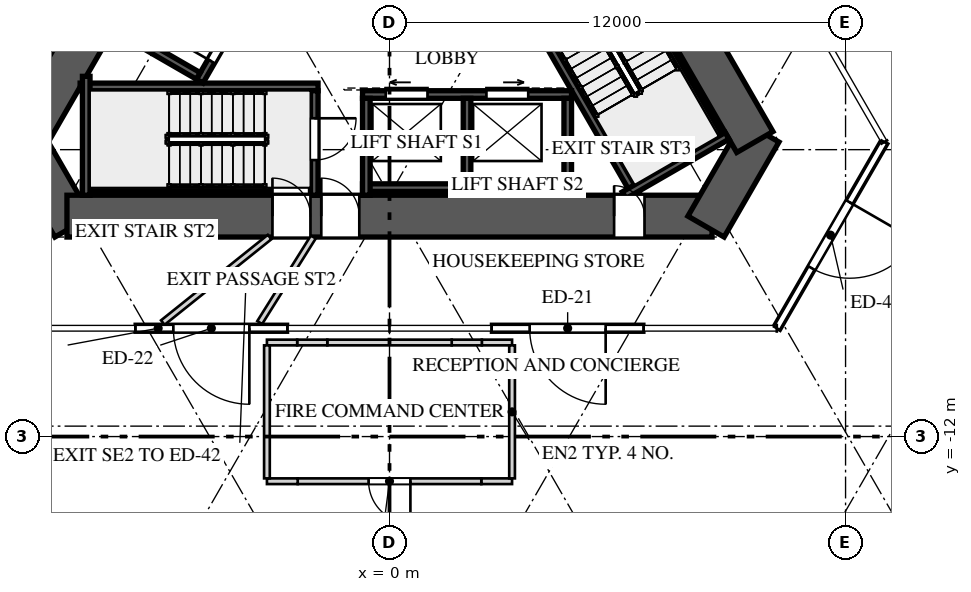
"""IFC4 building model, lengths in metres.
Left out: names, types, materials, properties, quantities, classifications, styles, units other than length and angle.
Written with IfcOpenShell. Run it as: python <this file> out.ifc"""

import sys

from ifc_helpers import new_model, si_unit, direction, frame, frame_2d, origin, place, context, subcontext, project, spatial, rectangle, extrude, element, fill, save


model = new_model("IFC4")
c1 = context("Model", 3, precision=1e-05, world=origin(), true_north=direction((0.0, 1.0)))
c2 = subcontext(c1, "Body", "Model", "MODEL_VIEW")
j1 = project(units=[si_unit("LENGTHUNIT", "METRE"), si_unit("PLANEANGLEUNIT", "RADIAN")], contexts=[c1])
p1 = place(None, origin())
s1 = spatial("IfcSite", under=j1, at=p1, CompositionType="ELEMENT")
p2 = place(p1, origin())
s2 = spatial("IfcBuilding", under=s1, at=p2, CompositionType="ELEMENT")
p3 = place(p2, origin())
s3 = spatial("IfcBuildingStorey", under=s2, at=p3, CompositionType="ELEMENT", Elevation=0.0)
p4 = place(p3, frame((-1.126, 10.45, 0.0), z_axis=(0.0, 0.0, 1.0), x_axis=(-0.500001757713, -0.866024388966, 0.0)))
e1 = element("IfcWall", 1, at=p4, inside=s3, PredefinedType="SHEAR", context=c2, shape_type="SweptSolid", body=[
    extrude(rectangle(XDim=16.974, YDim=1.1, at=frame_2d((8.487, 0.0))), origin(), (0.0, 0.0, 1.0), 10.0),
])
p5 = place(p4, frame((5.407, 0.0, 0.0)))
e2 = element("IfcOpeningElement", 2, at=p5, cuts=e1, PredefinedType="OPENING", context=c2, shape_type="SweptSolid", body=[
    extrude(rectangle(XDim=1.0, YDim=2.4, at=frame_2d((0.5, 1.2))), frame((0.0, 0.56, 0.0), z_axis=(0.0, -1.0, 0.0), x_axis=(1.0, 0.0, 0.0)), (0.0, 0.0, 1.0), 1.12),
])
p6 = place(p4, frame((6.692, 0.0, 0.0)))
e3 = element("IfcOpeningElement", 3, at=p6, cuts=e1, PredefinedType="OPENING", context=c2, shape_type="SweptSolid", body=[
    extrude(rectangle(XDim=1.0, YDim=2.4, at=frame_2d((0.5, 1.2))), frame((0.0, 0.56, 0.0), z_axis=(0.0, -1.0, 0.0), x_axis=(1.0, 0.0, 0.0)), (0.0, 0.0, 1.0), 1.12),
])
p7 = place(p3, frame((-9.772, -3.975, 0.0), z_axis=(0.0, 0.0, 1.0), x_axis=(0.499995765644, -0.866027848477, 0.0)))
e4 = element("IfcWall", 4, at=p7, inside=s3, PredefinedType="SHEAR", context=c2, shape_type="SweptSolid", body=[
    extrude(rectangle(XDim=2.887, YDim=1.1, at=frame_2d((1.443, 0.0))), origin(), (0.0, 0.0, 1.0), 10.0),
])
p8 = place(p3, frame((-8.487, -6.2, 0.0), z_axis=(0.0, 0.0, 1.0), x_axis=(1.0, 0.0, 0.0)))
e5 = element("IfcWall", 5, at=p8, inside=s3, PredefinedType="SHEAR", context=c2, shape_type="SweptSolid", body=[
    extrude(rectangle(XDim=16.974, YDim=1.1, at=frame_2d((8.487, 0.0))), origin(), (0.0, 0.0, 1.0), 10.0),
])
p9 = place(p8, frame((5.407, 0.0, 0.0)))
e6 = element("IfcOpeningElement", 6, at=p9, cuts=e5, PredefinedType="OPENING", context=c2, shape_type="SweptSolid", body=[
    extrude(rectangle(XDim=1.0, YDim=2.4, at=frame_2d((0.5, 1.2))), frame((0.0, 0.56, 0.0), z_axis=(0.0, -1.0, 0.0), x_axis=(1.0, 0.0, 0.0)), (0.0, 0.0, 1.0), 1.12),
])
p10 = place(p8, frame((6.692, 0.0, 0.0)))
e7 = element("IfcOpeningElement", 7, at=p10, cuts=e5, PredefinedType="OPENING", context=c2, shape_type="SweptSolid", body=[
    extrude(rectangle(XDim=1.0, YDim=2.4, at=frame_2d((0.5, 1.2))), frame((0.0, 0.56, 0.0), z_axis=(0.0, -1.0, 0.0), x_axis=(1.0, 0.0, 0.0)), (0.0, 0.0, 1.0), 1.12),
])
p11 = place(p8, frame((14.397, 0.0, 0.0)))
e8 = element("IfcOpeningElement", 8, at=p11, cuts=e5, PredefinedType="OPENING", context=c2, shape_type="SweptSolid", body=[
    extrude(rectangle(XDim=0.8, YDim=2.1, at=frame_2d((0.4, 1.05))), frame((0.0, 0.56, 0.0), z_axis=(0.0, -1.0, 0.0), x_axis=(1.0, 0.0, 0.0)), (0.0, 0.0, 1.0), 1.12),
])
p12 = place(p3, frame((8.328, -6.475, 0.0), z_axis=(0.0, 0.0, 1.0), x_axis=(0.499995765644, 0.866027848477, 0.0)))
e9 = element("IfcWall", 9, at=p12, inside=s3, PredefinedType="SHEAR", context=c2, shape_type="SweptSolid", body=[
    extrude(rectangle(XDim=2.887, YDim=1.1, at=frame_2d((1.443, 0.0))), origin(), (0.0, 0.0, 1.0), 10.0),
])
p13 = place(p3, frame((9.613, -4.25, 0.0), z_axis=(0.0, 0.0, 1.0), x_axis=(-0.500001757713, 0.866024388966, 0.0)))
e10 = element("IfcWall", 10, at=p13, inside=s3, PredefinedType="SHEAR", context=c2, shape_type="SweptSolid", body=[
    extrude(rectangle(XDim=16.974, YDim=1.1, at=frame_2d((8.487, 0.0))), origin(), (0.0, 0.0, 1.0), 10.0),
])
p14 = place(p13, frame((5.407, 0.0, 0.0)))
e11 = element("IfcOpeningElement", 11, at=p14, cuts=e10, PredefinedType="OPENING", context=c2, shape_type="SweptSolid", body=[
    extrude(rectangle(XDim=1.0, YDim=2.4, at=frame_2d((0.5, 1.2))), frame((0.0, 0.56, 0.0), z_axis=(0.0, -1.0, 0.0), x_axis=(1.0, 0.0, 0.0)), (0.0, 0.0, 1.0), 1.12),
])
p15 = place(p13, frame((6.762, 0.0, 0.0)))
e12 = element("IfcOpeningElement", 12, at=p15, cuts=e10, PredefinedType="OPENING", context=c2, shape_type="SweptSolid", body=[
    extrude(rectangle(XDim=1.0, YDim=2.4, at=frame_2d((0.5, 1.2))), frame((0.0, 0.56, 0.0), z_axis=(0.0, -1.0, 0.0), x_axis=(1.0, 0.0, 0.0)), (0.0, 0.0, 1.0), 1.12),
])
p16 = place(p13, frame((13.889, 0.0, 0.0)))
e13 = element("IfcOpeningElement", 13, at=p16, cuts=e10, PredefinedType="OPENING", context=c2, shape_type="SweptSolid", body=[
    extrude(rectangle(XDim=0.8, YDim=2.1, at=frame_2d((0.4, 1.05))), frame((0.0, 0.56, 0.0), z_axis=(0.0, -1.0, 0.0), x_axis=(1.0, 0.0, 0.0)), (0.0, 0.0, 1.0), 1.12),
])
p17 = place(p3, frame((13.019, -4.25, 0.0), z_axis=(0.0, 0.0, 1.0), x_axis=(-0.500018773155, -0.866014564827, 0.0)))
e14 = element("IfcWall", 14, at=p17, inside=s3, PredefinedType="STANDARD", context=c2, shape_type="SweptSolid", body=[
    extrude(rectangle(XDim=5.658, YDim=0.2, at=frame_2d((2.829, 0.0))), origin(), (0.0, 0.0, 1.0), 4.0),
])
p18 = place(p17, frame((1.829, 0.0, 0.0)))
e15 = element("IfcOpeningElement", 15, at=p18, cuts=e14, PredefinedType="OPENING", context=c2, shape_type="SweptSolid", body=[
    extrude(rectangle(XDim=2.0, YDim=2.6, at=frame_2d((1.0, 1.3))), frame((0.0, 0.11, 0.0), z_axis=(0.0, -1.0, 0.0), x_axis=(1.0, 0.0, 0.0)), (0.0, 0.0, 1.0), 0.22),
])
p19 = place(p3, frame((6.688, -9.15, 0.0), z_axis=(0.0, 0.0, 1.0), x_axis=(-1.0, 0.0, 0.0)))
e16 = element("IfcWall", 16, at=p19, inside=s3, PredefinedType="STANDARD", context=c2, shape_type="SweptSolid", body=[
    extrude(rectangle(XDim=4.0, YDim=0.2, at=frame_2d((2.0, 0.0))), origin(), (0.0, 0.0, 1.0), 4.0),
])
p20 = place(p19, frame((1.0, 0.0, 0.0)))
e17 = element("IfcOpeningElement", 17, at=p20, cuts=e16, PredefinedType="OPENING", context=c2, shape_type="SweptSolid", body=[
    extrude(rectangle(XDim=2.0, YDim=2.6, at=frame_2d((1.0, 1.3))), frame((0.0, 0.11, 0.0), z_axis=(0.0, -1.0, 0.0), x_axis=(1.0, 0.0, 0.0)), (0.0, 0.0, 1.0), 0.22),
])
p21 = place(p3, frame((-2.688, -9.15, 0.0), z_axis=(0.0, 0.0, 1.0), x_axis=(-1.0, 0.0, 0.0)))
e18 = element("IfcWall", 18, at=p21, inside=s3, PredefinedType="STANDARD", context=c2, shape_type="SweptSolid", body=[
    extrude(rectangle(XDim=4.0, YDim=0.2, at=frame_2d((2.0, 0.0))), origin(), (0.0, 0.0, 1.0), 4.0),
])
p22 = place(p21, frame((1.0, 0.0, 0.0)))
e19 = element("IfcOpeningElement", 19, at=p22, cuts=e18, PredefinedType="OPENING", context=c2, shape_type="SweptSolid", body=[
    extrude(rectangle(XDim=2.0, YDim=2.6, at=frame_2d((1.0, 1.3))), frame((0.0, 0.11, 0.0), z_axis=(0.0, -1.0, 0.0), x_axis=(1.0, 0.0, 0.0)), (0.0, 0.0, 1.0), 0.22),
])
p23 = place(p3, frame((-8.08, -5.45, 0.0), z_axis=(0.0, 0.0, 1.0), x_axis=(1.0, 0.0, 0.0)))
e20 = element("IfcWall", 20, at=p23, inside=s3, PredefinedType="SOLIDWALL", context=c2, shape_type="SweptSolid", body=[
    extrude(rectangle(XDim=4.95, YDim=0.2, at=frame_2d((2.475, 0.0))), origin(), (0.0, 0.0, 1.0), 9.65),
])
p24 = place(p3, frame((-8.141, -2.8, 0.0), z_axis=(0.0, 0.0, 1.0), x_axis=(1.0, 0.0, 0.0)))
e21 = element("IfcWall", 21, at=p24, inside=s3, PredefinedType="SOLIDWALL", context=c2, shape_type="SweptSolid", body=[
    extrude(rectangle(XDim=6.261, YDim=0.2, at=frame_2d((3.13, 0.0))), origin(), (0.0, 0.0, 1.0), 9.65),
])
p25 = place(p3, frame((-7.98, -2.522, 0.0), z_axis=(0.0, 0.0, 1.0), x_axis=(0.0, -1.0, 0.0)))
e22 = element("IfcWall", 22, at=p25, inside=s3, PredefinedType="SOLIDWALL", context=c2, shape_type="SweptSolid", body=[
    extrude(rectangle(XDim=3.128, YDim=0.2, at=frame_2d((1.564, 0.0))), origin(), (0.0, 0.0, 1.0), 9.65),
])
p26 = place(p3, frame((-1.98, -2.9, 0.0), z_axis=(0.0, 0.0, 1.0), x_axis=(0.0, -1.0, 0.0)))
e23 = element("IfcWall", 23, at=p26, inside=s3, PredefinedType="SOLIDWALL", context=c2, shape_type="SweptSolid", body=[
    extrude(rectangle(XDim=2.75, YDim=0.2, at=frame_2d((1.375, 0.0))), origin(), (0.0, 0.0, 1.0), 9.65),
])
p27 = place(p26, frame((0.725, 0.0, 0.0)))
e24 = element("IfcOpeningElement", 24, at=p27, cuts=e23, PredefinedType="OPENING", context=c2, shape_type="SweptSolid", body=[
    extrude(rectangle(XDim=1.1, YDim=2.4, at=frame_2d((0.55, 1.2))), frame((0.0, 0.11, 0.0), z_axis=(0.0, -1.0, 0.0), x_axis=(1.0, 0.0, 0.0)), (0.0, 0.0, 1.0), 0.22),
])
p28 = place(p3, frame((8.76, -4.272, 0.0), z_axis=(0.0, 0.0, 1.0), x_axis=(-0.499974350878, 0.866040211805, 0.0)))
e25 = element("IfcWall", 25, at=p28, inside=s3, PredefinedType="SOLIDWALL", context=c2, shape_type="SweptSolid", body=[
    extrude(rectangle(XDim=4.95, YDim=0.2, at=frame_2d((2.475, 0.0))), origin(), (0.0, 0.0, 1.0), 9.65),
])
p29 = place(p3, frame((6.495, -5.65, 0.0), z_axis=(0.0, 0.0, 1.0), x_axis=(-0.499976754523, 0.866038824151, 0.0)))
e26 = element("IfcWall", 26, at=p29, inside=s3, PredefinedType="SOLIDWALL", context=c2, shape_type="SweptSolid", body=[
    extrude(rectangle(XDim=6.26, YDim=0.2, at=frame_2d((3.13, 0.0))), origin(), (0.0, 0.0, 1.0), 9.65),
])
p30 = place(p3, frame((6.174, -5.65, 0.0), z_axis=(0.0, 0.0, 1.0), x_axis=(0.866054327916, 0.499949898588, 0.0)))
e27 = element("IfcWall", 27, at=p30, inside=s3, PredefinedType="SOLIDWALL", context=c2, shape_type="SweptSolid", body=[
    extrude(rectangle(XDim=3.128, YDim=0.2, at=frame_2d((1.564, 0.0))), origin(), (0.0, 0.0, 1.0), 9.65),
])
p31 = place(p3, frame((-4.993, -2.648, 0.0), z_axis=(0.0, 0.0, 1.0), x_axis=(0.499996545922, 0.866027397988, 0.0)))
e28 = element("IfcWall", 28, at=p31, inside=s3, PredefinedType="SOLIDWALL", context=c2, shape_type="SweptSolid", body=[
    extrude(rectangle(XDim=5.5, YDim=0.2, at=frame_2d((2.75, 0.0))), origin(), (0.0, 0.0, 1.0), 9.65),
])
p32 = place(p31, frame((3.12, 0.0, 0.0)))
e29 = element("IfcOpeningElement", 29, at=p32, cuts=e28, PredefinedType="OPENING", context=c2, shape_type="SweptSolid", body=[
    extrude(rectangle(XDim=0.95, YDim=2.4, at=frame_2d((0.475, 1.2))), frame((0.0, 0.11, 0.0), z_axis=(0.0, -1.0, 0.0), x_axis=(1.0, 0.0, 0.0)), (0.0, 0.0, 1.0), 0.22),
])
p33 = place(p31, frame((0.605, 0.0, 0.0)))
e30 = element("IfcOpeningElement", 30, at=p33, cuts=e28, PredefinedType="OPENING", context=c2, shape_type="SweptSolid", body=[
    extrude(rectangle(XDim=0.8, YDim=2.1, at=frame_2d((0.4, 1.05))), frame((0.0, 0.11, 0.0), z_axis=(0.0, -1.0, 0.0), x_axis=(1.0, 0.0, 0.0)), (0.0, 0.0, 1.0), 0.22),
])
p34 = place(p3, frame((-5.03, -2.512, 0.0), z_axis=(0.0, 0.0, 1.0), x_axis=(-0.865989465428, 0.500062241894, 0.0)))
e31 = element("IfcWall", 31, at=p34, inside=s3, PredefinedType="SOLIDWALL", context=c2, shape_type="SweptSolid", body=[
    extrude(rectangle(XDim=2.55, YDim=0.2, at=frame_2d((1.275, 0.0))), origin(), (0.0, 0.0, 1.0), 9.65),
])
p35 = place(p3, frame((-0.71, -3.0, 0.0), z_axis=(0.0, 0.0, 1.0), x_axis=(1.0, 0.0, 0.0)))
e32 = element("IfcWall", 32, at=p35, inside=s3, PredefinedType="SOLIDWALL", context=c2, shape_type="SweptSolid", body=[
    extrude(rectangle(XDim=5.5, YDim=0.2, at=frame_2d((2.75, 0.0))), origin(), (0.0, 0.0, 1.0), 9.65),
])
p36 = place(p35, frame((0.61, 0.0, 0.0)))
e33 = element("IfcOpeningElement", 33, at=p36, cuts=e32, PredefinedType="OPENING", context=c2, shape_type="SweptSolid", body=[
    extrude(rectangle(XDim=1.1, YDim=2.1, at=frame_2d((0.55, 1.05))), frame((0.0, 0.11, 0.0), z_axis=(0.0, -1.0, 0.0), x_axis=(1.0, 0.0, 0.0)), (0.0, 0.0, 1.0), 0.22),
])
p37 = place(p35, frame((3.26, 0.0, 0.0)))
e34 = element("IfcOpeningElement", 34, at=p37, cuts=e32, PredefinedType="OPENING", context=c2, shape_type="SweptSolid", body=[
    extrude(rectangle(XDim=1.1, YDim=2.1, at=frame_2d((0.55, 1.05))), frame((0.0, 0.11, 0.0), z_axis=(0.0, -1.0, 0.0), x_axis=(1.0, 0.0, 0.0)), (0.0, 0.0, 1.0), 0.22),
])
p38 = place(p3, frame((-0.71, -5.45, 0.0), z_axis=(0.0, 0.0, 1.0), x_axis=(1.0, 0.0, 0.0)))
e35 = element("IfcWall", 35, at=p38, inside=s3, PredefinedType="SOLIDWALL", context=c2, shape_type="SweptSolid", body=[
    extrude(rectangle(XDim=5.5, YDim=0.2, at=frame_2d((2.75, 0.0))), origin(), (0.0, 0.0, 1.0), 9.65),
])
for number, where, z_axis, x_axis in (
    (36, (-0.61, -3.1, 0.0), (0.0, 0.0, 1.0), (0.0, -1.0, 0.0)),
    (37, (2.04, -3.1, 0.0), (0.0, 0.0, 1.0), (0.0, -1.0, 0.0)),
    (38, (4.69, -3.1, 0.0), (0.0, 0.0, 1.0), (0.0, -1.0, 0.0)),
):
    element("IfcWall", number, at=place(p3, frame(where, z_axis=z_axis, x_axis=x_axis)), inside=s3, PredefinedType="SOLIDWALL", context=c2, shape_type="SweptSolid", body=[
        extrude(rectangle(XDim=2.55, YDim=0.2, at=frame_2d((1.275, 0.0))), origin(), (0.0, 0.0, 1.0), 9.65),
    ])
p39 = place(p3, frame((-3.155, -6.75, 0.0), z_axis=(0.0, 0.0, 1.0), x_axis=(-0.780560976865, -0.625079644042, 0.0)))
e39 = element("IfcWall", 39, at=p39, inside=s3, PredefinedType="PARTITIONING", context=c2, shape_type="SweptSolid", body=[
    extrude(rectangle(XDim=1.858, YDim=0.15, at=frame_2d((0.929, 0.0))), origin(), (0.0, 0.0, 1.0), 9.65),
])
p40 = place(p3, frame((-4.605, -7.911, 0.0), z_axis=(0.0, 0.0, 1.0), x_axis=(-0.780650026042, -0.624968428675, 0.0)))
e40 = element("IfcWall", 40, at=p40, inside=s3, PredefinedType="PARTITIONING", context=c2, shape_type="SweptSolid", body=[
    extrude(rectangle(XDim=1.742, YDim=0.15, at=frame_2d((0.871, 0.0))), origin(), (0.0, 0.0, 1.0), 8.75),
])
p41 = place(p3, frame((-2.005, -6.75, 0.0), z_axis=(0.0, 0.0, 1.0), x_axis=(-0.53105637592, -0.847336489002, 0.0)))
e41 = element("IfcWall", 41, at=p41, inside=s3, PredefinedType="PARTITIONING", context=c2, shape_type="SweptSolid", body=[
    extrude(rectangle(XDim=2.655, YDim=0.15, at=frame_2d((1.328, 0.0))), origin(), (0.0, 0.0, 1.0), 9.65),
])
p42 = place(p3, frame((3.225, -9.525, 0.0), z_axis=(0.0, 0.0, 1.0), x_axis=(-1.0, 0.0, 0.0)))
e42 = element("IfcWall", 42, at=p42, inside=s3, PredefinedType="SOLIDWALL", context=c2, shape_type="SweptSolid", body=[
    extrude(rectangle(XDim=0.796, YDim=0.15, at=frame_2d((0.398, 0.0))), origin(), (0.0, 0.0, 1.0), 9.65),
])
p43 = place(p3, frame((2.429, -9.525, 0.0), z_axis=(0.0, 0.0, 1.0), x_axis=(-1.0, 0.0, 0.0)))
e43 = element("IfcWall", 43, at=p43, inside=s3, PredefinedType="SOLIDWALL", context=c2, shape_type="SweptSolid", body=[
    extrude(rectangle(XDim=0.792, YDim=0.15, at=frame_2d((0.396, 0.0))), origin(), (0.0, 0.0, 1.0), 8.75),
])
p44 = place(p3, frame((1.637, -9.525, 0.0), z_axis=(0.0, 0.0, 1.0), x_axis=(-1.0, 0.0, 0.0)))
e44 = element("IfcWall", 44, at=p44, inside=s3, PredefinedType="SOLIDWALL", context=c2, shape_type="SweptSolid", body=[
    extrude(rectangle(XDim=3.273, YDim=0.15, at=frame_2d((1.637, 0.0))), origin(), (0.0, 0.0, 1.0), 9.65),
])
p45 = place(p3, frame((-1.637, -9.525, 0.0), z_axis=(0.0, 0.0, 1.0), x_axis=(-1.0, 0.0, 0.0)))
e45 = element("IfcWall", 45, at=p45, inside=s3, PredefinedType="SOLIDWALL", context=c2, shape_type="SweptSolid", body=[
    extrude(rectangle(XDim=0.792, YDim=0.15, at=frame_2d((0.396, 0.0))), origin(), (0.0, 0.0, 1.0), 8.75),
])
p46 = place(p3, frame((-2.429, -9.525, 0.0), z_axis=(0.0, 0.0, 1.0), x_axis=(-1.0, 0.0, 0.0)))
e46 = element("IfcWall", 46, at=p46, inside=s3, PredefinedType="SOLIDWALL", context=c2, shape_type="SweptSolid", body=[
    extrude(rectangle(XDim=0.796, YDim=0.15, at=frame_2d((0.398, 0.0))), origin(), (0.0, 0.0, 1.0), 9.65),
])
p47 = place(p3, frame((3.225, -13.175, 0.0), z_axis=(0.0, 0.0, 1.0), x_axis=(-1.0, 0.0, 0.0)))
e47 = element("IfcWall", 47, at=p47, inside=s3, PredefinedType="SOLIDWALL", context=c2, shape_type="SweptSolid", body=[
    extrude(rectangle(XDim=0.81, YDim=0.15, at=frame_2d((0.405, 0.0))), origin(), (0.0, 0.0, 1.0), 8.75),
])
p48 = place(p3, frame((2.416, -13.175, 0.0), z_axis=(0.0, 0.0, 1.0), x_axis=(-1.0, 0.0, 0.0)))
e48 = element("IfcWall", 48, at=p48, inside=s3, PredefinedType="SOLIDWALL", context=c2, shape_type="SweptSolid", body=[
    extrude(rectangle(XDim=4.831, YDim=0.15, at=frame_2d((2.416, 0.0))), origin(), (0.0, 0.0, 1.0), 9.65),
])
p49 = place(p48, frame((1.866, 0.0, 0.0)))
e49 = element("IfcOpeningElement", 49, at=p49, cuts=e48, PredefinedType="OPENING", context=c2, shape_type="SweptSolid", body=[
    extrude(rectangle(XDim=1.1, YDim=2.4, at=frame_2d((0.55, 1.2))), frame((0.0, 0.085, 0.0), z_axis=(0.0, -1.0, 0.0), x_axis=(1.0, 0.0, 0.0)), (0.0, 0.0, 1.0), 0.17),
])
p50 = place(p3, frame((-2.416, -13.175, 0.0), z_axis=(0.0, 0.0, 1.0), x_axis=(-1.0, 0.0, 0.0)))
e50 = element("IfcWall", 50, at=p50, inside=s3, PredefinedType="SOLIDWALL", context=c2, shape_type="SweptSolid", body=[
    extrude(rectangle(XDim=0.81, YDim=0.15, at=frame_2d((0.405, 0.0))), origin(), (0.0, 0.0, 1.0), 8.75),
])
for number, where, z_axis, x_axis in (
    (51, (3.225, -9.6, 0.0), (0.0, 0.0, 1.0), (0.0, -1.0, 0.0)),
    (52, (-3.225, -9.6, 0.0), (0.0, 0.0, 1.0), (0.0, -1.0, 0.0)),
):
    element("IfcWall", number, at=place(p3, frame(where, z_axis=z_axis, x_axis=x_axis)), inside=s3, PredefinedType="SOLIDWALL", context=c2, shape_type="SweptSolid", body=[
        extrude(rectangle(XDim=3.5, YDim=0.15, at=frame_2d((1.75, 0.0))), origin(), (0.0, 0.0, 1.0), 9.65),
    ])
p51 = place(p18, origin())
e53 = element("IfcDoor", 53, at=p51, inside=s3, OperationType="DOUBLE_DOOR_SINGLE_SWING", PredefinedType="DOOR", context=c2, shape_type="SweptSolid", body=[
    extrude(rectangle(XDim=2.0, YDim=2.6, at=frame_2d((1.0, 1.3))), frame((0.0, 0.025, 0.0), z_axis=(0.0, -1.0, 0.0), x_axis=(1.0, 0.0, 0.0)), (0.0, 0.0, 1.0), 0.05),
])
fill(e15, e53)
p52 = place(p20, origin())
e54 = element("IfcDoor", 54, at=p52, inside=s3, OperationType="DOUBLE_DOOR_SINGLE_SWING", PredefinedType="DOOR", context=c2, shape_type="SweptSolid", body=[
    extrude(rectangle(XDim=2.0, YDim=2.6, at=frame_2d((1.0, 1.3))), frame((0.0, 0.025, 0.0), z_axis=(0.0, -1.0, 0.0), x_axis=(1.0, 0.0, 0.0)), (0.0, 0.0, 1.0), 0.05),
])
fill(e17, e54)
p53 = place(p22, origin())
e55 = element("IfcDoor", 55, at=p53, inside=s3, OperationType="DOUBLE_DOOR_SINGLE_SWING", PredefinedType="DOOR", context=c2, shape_type="SweptSolid", body=[
    extrude(rectangle(XDim=2.0, YDim=2.6, at=frame_2d((1.0, 1.3))), frame((0.0, 0.025, 0.0), z_axis=(0.0, -1.0, 0.0), x_axis=(1.0, 0.0, 0.0)), (0.0, 0.0, 1.0), 0.05),
])
fill(e19, e55)
p54 = place(p27, origin())
e56 = element("IfcDoor", 56, at=p54, inside=s3, OperationType="SINGLE_SWING_LEFT", PredefinedType="DOOR", context=c2, shape_type="SweptSolid", body=[
    extrude(rectangle(XDim=1.1, YDim=2.4, at=frame_2d((0.55, 1.2))), frame((0.0, 0.025, 0.0), z_axis=(0.0, -1.0, 0.0), x_axis=(1.0, 0.0, 0.0)), (0.0, 0.0, 1.0), 0.05),
])
fill(e24, e56)
p55 = place(p33, origin())
e57 = element("IfcDoor", 57, at=p55, inside=s3, OperationType="SINGLE_SWING_RIGHT", PredefinedType="DOOR", context=c2, shape_type="SweptSolid", body=[
    extrude(rectangle(XDim=0.8, YDim=2.1, at=frame_2d((0.4, 1.05))), frame((0.0, 0.025, 0.0), z_axis=(0.0, -1.0, 0.0), x_axis=(1.0, 0.0, 0.0)), (0.0, 0.0, 1.0), 0.05),
])
fill(e30, e57)
p56 = place(p36, origin())
e58 = element("IfcDoor", 58, at=p56, inside=s3, OperationType="SLIDING_TO_LEFT", PredefinedType="DOOR", context=c2, shape_type="SweptSolid", body=[
    extrude(rectangle(XDim=1.1, YDim=2.1, at=frame_2d((0.55, 1.05))), frame((0.0, 0.025, 0.0), z_axis=(0.0, -1.0, 0.0), x_axis=(1.0, 0.0, 0.0)), (0.0, 0.0, 1.0), 0.05),
])
fill(e33, e58)
p57 = place(p37, origin())
e59 = element("IfcDoor", 59, at=p57, inside=s3, OperationType="SLIDING_TO_RIGHT", PredefinedType="DOOR", context=c2, shape_type="SweptSolid", body=[
    extrude(rectangle(XDim=1.1, YDim=2.1, at=frame_2d((0.55, 1.05))), frame((0.0, 0.025, 0.0), z_axis=(0.0, -1.0, 0.0), x_axis=(1.0, 0.0, 0.0)), (0.0, 0.0, 1.0), 0.05),
])
fill(e34, e59)
p58 = place(p9, origin())
e60 = element("IfcDoor", 60, at=p58, inside=s3, OperationType="SINGLE_SWING_RIGHT", PredefinedType="DOOR", context=c2, shape_type="SweptSolid", body=[
    extrude(rectangle(XDim=1.0, YDim=2.4, at=frame_2d((0.5, 1.2))), frame((0.0, 0.025, 0.0), z_axis=(0.0, -1.0, 0.0), x_axis=(1.0, 0.0, 0.0)), (0.0, 0.0, 1.0), 0.05),
])
fill(e6, e60)
p59 = place(p10, origin())
e61 = element("IfcDoor", 61, at=p59, inside=s3, OperationType="SINGLE_SWING_RIGHT", PredefinedType="DOOR", context=c2, shape_type="SweptSolid", body=[
    extrude(rectangle(XDim=1.0, YDim=2.4, at=frame_2d((0.5, 1.2))), frame((0.0, 0.025, 0.0), z_axis=(0.0, -1.0, 0.0), x_axis=(1.0, 0.0, 0.0)), (0.0, 0.0, 1.0), 0.05),
])
fill(e7, e61)
p60 = place(p11, origin())
e62 = element("IfcDoor", 62, at=p60, inside=s3, OperationType="SINGLE_SWING_RIGHT", PredefinedType="DOOR", context=c2, shape_type="SweptSolid", body=[
    extrude(rectangle(XDim=0.8, YDim=2.1, at=frame_2d((0.4, 1.05))), frame((0.0, 0.025, 0.0), z_axis=(0.0, -1.0, 0.0), x_axis=(1.0, 0.0, 0.0)), (0.0, 0.0, 1.0), 0.05),
])
fill(e8, e62)
p61 = place(p49, origin())
e63 = element("IfcDoor", 63, at=p61, inside=s3, OperationType="SINGLE_SWING_RIGHT", PredefinedType="DOOR", context=c2, shape_type="SweptSolid", body=[
    extrude(rectangle(XDim=1.1, YDim=2.4, at=frame_2d((0.55, 1.2))), frame((0.0, 0.025, 0.0), z_axis=(0.0, -1.0, 0.0), x_axis=(1.0, 0.0, 0.0)), (0.0, 0.0, 1.0), 0.05),
])
fill(e49, e63)
save(model, sys.argv[1])
